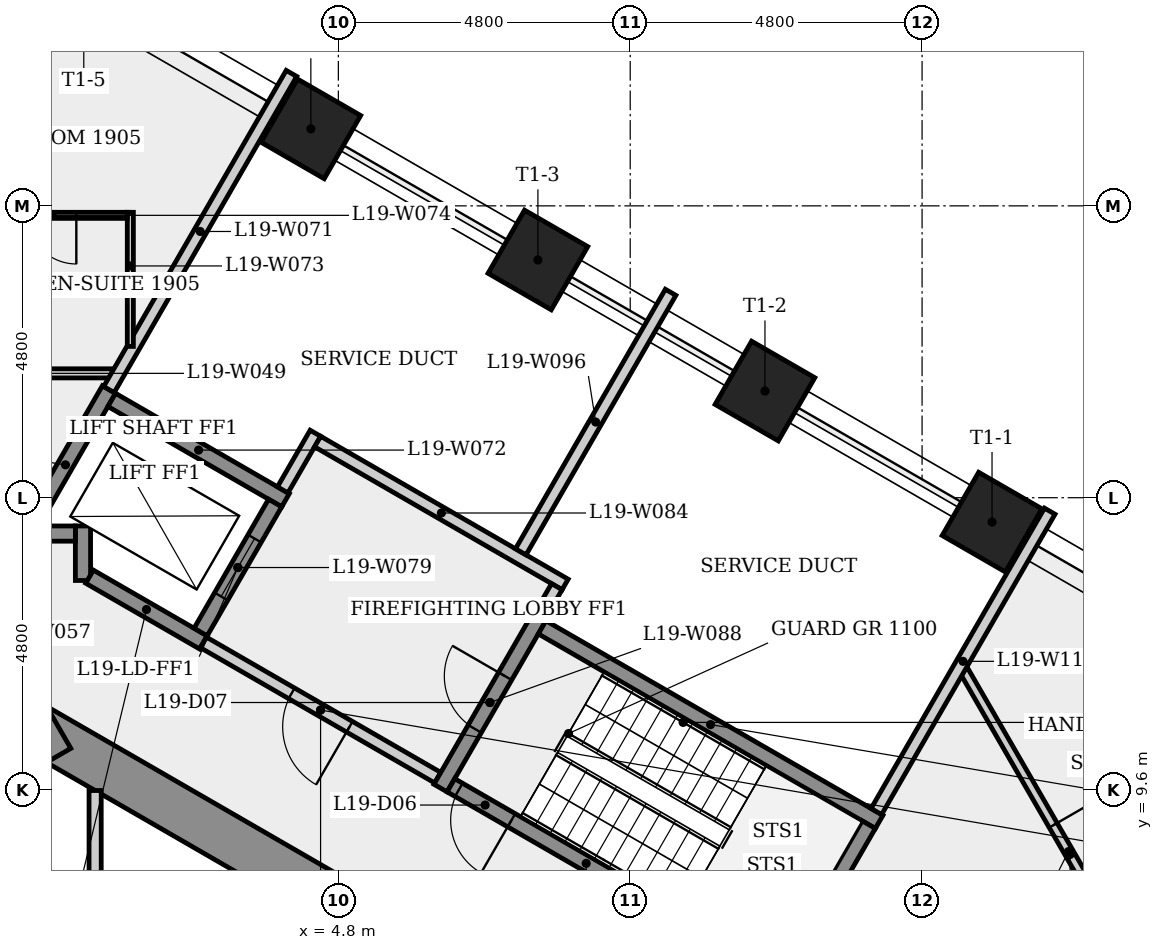
"""IFC4 building model, lengths in metres.
Left out: names, types, materials, properties, quantities, classifications, styles, units other than length and angle.
Written with IfcOpenShell. Run it as: python <this file> out.ifc"""

import sys

from ifc_helpers import new_model, si_unit, direction, frame, frame_2d, origin, origin_2d, place, context, subcontext, project, spatial, rectangle, extrude, element, fill, save


model = new_model("IFC4")
c1 = context("Model", 3, precision=1e-05, world=origin(), true_north=direction((0.0, 1.0)))
c2 = subcontext(c1, "Body", "Model", "MODEL_VIEW")
j1 = project(units=[si_unit("LENGTHUNIT", "METRE"), si_unit("PLANEANGLEUNIT", "RADIAN")], contexts=[c1])
p1 = place(None, origin())
s1 = spatial("IfcSite", under=j1, at=p1, CompositionType="ELEMENT")
p2 = place(p1, origin())
s2 = spatial("IfcBuilding", under=s1, at=p2, CompositionType="ELEMENT")
p3 = place(p2, frame((0.0, 0.0, 74.3)))
s3 = spatial("IfcBuildingStorey", under=s2, at=p3, CompositionType="ELEMENT", Elevation=74.3)
p4 = place(p3, frame((9.3, 5.138, 0.0), z_axis=(0.0, 0.0, 1.0), x_axis=(-0.866023993627, 0.500002442456, 0.0)))
e1 = element("IfcWall", 1, at=p4, inside=s3, PredefinedType="SHEAR", context=c2, shape_type="SweptSolid", body=[
    extrude(rectangle(XDim=10.97, YDim=0.8, at=frame_2d((5.485, 0.0))), origin(), (0.0, 0.0, 1.0), 4.0),
])
p5 = place(p4, frame((2.962, 0.0, 0.0)))
e2 = element("IfcOpeningElement", 2, at=p5, cuts=e1, PredefinedType="OPENING", context=c2, shape_type="SweptSolid", body=[
    extrude(rectangle(XDim=0.9, YDim=2.1, at=frame_2d((0.45, 1.05))), frame((0.0, 0.41, 0.0), z_axis=(0.0, -1.0, 0.0), x_axis=(1.0, 0.0, 0.0)), (0.0, 0.0, 1.0), 0.82),
])
p6 = place(p3, frame((0.2, 10.623, 0.0), z_axis=(0.0, 0.0, 1.0), x_axis=(-0.866023993627, -0.500002442456, 0.0)))
e3 = element("IfcWall", 3, at=p6, inside=s3, PredefinedType="SHEAR", context=c2, shape_type="SweptSolid", body=[
    extrude(rectangle(XDim=10.97, YDim=0.8, at=frame_2d((5.485, 0.0))), origin(), (0.0, 0.0, 1.0), 4.0),
])
p7 = place(p6, frame((9.325, 0.0, 0.0)))
e4 = element("IfcOpeningElement", 4, at=p7, cuts=e3, PredefinedType="OPENING", context=c2, shape_type="SweptSolid", body=[
    extrude(rectangle(XDim=0.9, YDim=2.1, at=frame_2d((0.45, 1.05))), frame((0.0, 0.41, 0.0), z_axis=(0.0, -1.0, 0.0), x_axis=(1.0, 0.0, 0.0)), (0.0, 0.0, 1.0), 0.82),
])
p8 = place(p6, frame((2.091, 0.0, 0.0)))
e5 = element("IfcOpeningElement", 5, at=p8, cuts=e3, PredefinedType="OPENING", context=c2, shape_type="SweptSolid", body=[
    extrude(rectangle(XDim=0.9, YDim=2.1, at=frame_2d((0.45, 1.05))), frame((0.0, 0.41, 0.0), z_axis=(0.0, -1.0, 0.0), x_axis=(1.0, 0.0, 0.0)), (0.0, 0.0, 1.0), 0.82),
])
for number, where, z_axis, x_axis in (
    (6, (15.55, 13.998, 0.0), (0.0, 0.0, 1.0), (0.5, 0.866, 0.0)),
    (7, (11.816, 16.154, 0.0), (0.0, 0.0, 1.0), (0.5, 0.866, 0.0)),
    (8, (8.082, 18.31, 0.0), (0.0, 0.0, 1.0), (0.5, 0.866, 0.0)),
    (9, (4.348, 20.466, 0.0), (0.0, 0.0, 1.0), (0.5, 0.866, 0.0)),
):
    element("IfcColumn", number, at=place(p3, frame(where, z_axis=z_axis, x_axis=x_axis)), inside=s3, PredefinedType="COLUMN", context=c2, shape_type="SweptSolid", body=[
        extrude(rectangle(XDim=1.2, YDim=1.2, at=origin_2d()), origin(), (0.0, 0.0, 1.0), 4.0),
    ])
p9 = place(p3, frame((-3.325, 16.445, 0.0), z_axis=(0.0, 0.0, 1.0), x_axis=(1.0, 0.0, 0.0)))
e10 = element("IfcWall", 10, at=p9, inside=s3, PredefinedType="PARTITIONING", context=c2, shape_type="SweptSolid", body=[
    extrude(rectangle(XDim=4.406, YDim=0.15, at=frame_2d((2.203, 0.0))), origin(), (0.0, 0.0, 1.0), 3.6),
])
p10 = place(p9, frame((0.745, 0.0, 0.0)))
e11 = element("IfcOpeningElement", 11, at=p10, cuts=e10, PredefinedType="OPENING", context=c2, shape_type="SweptSolid", body=[
    extrude(rectangle(XDim=0.9, YDim=2.1, at=frame_2d((0.45, 1.05))), frame((0.0, 0.085, 0.0), z_axis=(0.0, -1.0, 0.0), x_axis=(1.0, 0.0, 0.0)), (0.0, 0.0, 1.0), 0.17),
])
p11 = place(p3, frame((-0.403, 13.702, 0.0), z_axis=(0.0, 0.0, 1.0), x_axis=(0.499976111731, 0.866039195244, 0.0)))
e12 = element("IfcWall", 12, at=p11, inside=s3, PredefinedType="SHEAR", context=c2, shape_type="SweptSolid", body=[
    extrude(rectangle(XDim=2.861, YDim=0.25, at=frame_2d((1.43, 0.0))), origin(), (0.0, 0.0, 1.0), 3.6),
])
p12 = place(p3, frame((0.6, 13.039, 0.0), z_axis=(0.0, 0.0, 1.0), x_axis=(0.0, 1.0, 0.0)))
e13 = element("IfcWall", 13, at=p12, inside=s3, PredefinedType="SHEAR", context=c2, shape_type="SweptSolid", body=[
    extrude(rectangle(XDim=0.896, YDim=0.25, at=frame_2d((0.448, 0.0))), origin(), (0.0, 0.0, 1.0), 3.6),
])
p13 = place(p3, frame((0.475, 13.81, 0.0), z_axis=(0.0, 0.0, 1.0), x_axis=(-1.0, 0.0, 0.0)))
e14 = element("IfcWall", 14, at=p13, inside=s3, PredefinedType="SHEAR", context=c2, shape_type="SweptSolid", body=[
    extrude(rectangle(XDim=0.691, YDim=0.25, at=frame_2d((0.345, 0.0))), origin(), (0.0, 0.0, 1.0), 4.0),
])
p14 = place(p3, frame((0.8, 9.584, 0.0), z_axis=(0.0, 0.0, 1.0), x_axis=(0.0, -1.0, 0.0)))
e15 = element("IfcWall", 15, at=p14, inside=s3, PredefinedType="PARTITIONING", context=c2, shape_type="SweptSolid", body=[
    extrude(rectangle(XDim=4.309, YDim=0.2, at=frame_2d((2.155, 0.0))), origin(), (0.0, 0.0, 1.0), 3.6),
])
p15 = place(p3, frame((1.027, 16.179, 0.0), z_axis=(0.0, 0.0, 1.0), x_axis=(0.500005224826, 0.866022387209, 0.0)))
e16 = element("IfcWall", 16, at=p15, inside=s3, PredefinedType="PLUMBINGWALL", context=c2, shape_type="SweptSolid", body=[
    extrude(rectangle(XDim=6.004, YDim=0.2, at=frame_2d((3.002, 0.0))), origin(), (0.0, 0.0, 1.0), 3.6),
])
p16 = place(p3, frame((1.073, 16.008, 0.0), z_axis=(0.0, 0.0, 1.0), x_axis=(0.866040211805, -0.499974350878, 0.0)))
e17 = element("IfcWall", 17, at=p16, inside=s3, PredefinedType="SHEAR", context=c2, shape_type="SweptSolid", body=[
    extrude(rectangle(XDim=3.3, YDim=0.25, at=frame_2d((1.65, 0.0))), origin(), (0.0, 0.0, 1.0), 3.6),
])
p17 = place(p3, frame((1.379, 16.888, 0.0), z_axis=(0.0, 0.0, 1.0), x_axis=(0.0, 1.0, 0.0)))
e18 = element("IfcWall", 18, at=p17, inside=s3, PredefinedType="PARTITIONING", context=c2, shape_type="SweptSolid", body=[
    extrude(rectangle(XDim=2.206, YDim=0.1, at=frame_2d((1.103, 0.0))), origin(), (0.0, 0.0, 1.0), 3.6),
])
p18 = place(p3, frame((1.329, 19.044, 0.0), z_axis=(0.0, 0.0, 1.0), x_axis=(-1.0, 0.0, 0.0)))
e19 = element("IfcWall", 19, at=p18, inside=s3, PredefinedType="PARTITIONING", context=c2, shape_type="SweptSolid", body=[
    extrude(rectangle(XDim=2.476, YDim=0.1, at=frame_2d((1.238, 0.0))), origin(), (0.0, 0.0, 1.0), 3.6),
])
p19 = place(p18, frame((0.838, 0.0, 0.0)))
e20 = element("IfcOpeningElement", 20, at=p19, cuts=e19, PredefinedType="OPENING", context=c2, shape_type="SweptSolid", body=[
    extrude(rectangle(XDim=0.8, YDim=2.1, at=frame_2d((0.4, 1.05))), frame((0.0, 0.06, 0.0), z_axis=(0.0, -1.0, 0.0), x_axis=(1.0, 0.0, 0.0)), (0.0, 0.0, 1.0), 0.12),
])
p20 = place(p3, frame((2.581, 12.02, 0.0), z_axis=(0.0, 0.0, 1.0), x_axis=(-0.86603892542, 0.499976579108, 0.0)))
e21 = element("IfcWall", 21, at=p20, inside=s3, PredefinedType="SHEAR", context=c2, shape_type="SweptSolid", body=[
    extrude(rectangle(XDim=2.162, YDim=0.25, at=frame_2d((1.081, 0.0))), origin(), (0.0, 0.0, 1.0), 3.6),
])
p21 = place(p3, frame((2.535, 12.191, 0.0), z_axis=(0.0, 0.0, 1.0), x_axis=(0.500061746146, 0.865989751695, 0.0)))
e22 = element("IfcWall", 22, at=p21, inside=s3, PredefinedType="SHEAR", context=c2, shape_type="SweptSolid", body=[
    extrude(rectangle(XDim=2.45, YDim=0.25, at=frame_2d((1.225, 0.0))), origin(), (0.0, 0.0, 1.0), 4.0),
])
p22 = place(p21, frame((0.675, 0.0, 0.0)))
e23 = element("IfcOpeningElement", 23, at=p22, cuts=e22, PredefinedType="OPENING", context=c2, shape_type="SweptSolid", body=[
    extrude(rectangle(XDim=1.1, YDim=2.1, at=frame_2d((0.55, 1.05))), frame((0.0, 0.135, 0.0), z_axis=(0.0, -1.0, 0.0), x_axis=(1.0, 0.0, 0.0)), (0.0, 0.0, 1.0), 0.27),
])
p23 = place(p3, frame((3.885, 14.529, 0.0), z_axis=(0.0, 0.0, 1.0), x_axis=(0.499997628298, 0.866026773083, 0.0)))
e24 = element("IfcWall", 24, at=p23, inside=s3, PredefinedType="PLUMBINGWALL", context=c2, shape_type="SweptSolid", body=[
    extrude(rectangle(XDim=1.075, YDim=0.2, at=frame_2d((0.538, 0.0))), origin(), (0.0, 0.0, 1.0), 3.6),
])
p24 = place(p3, frame((4.459, 15.323, 0.0), z_axis=(0.0, 0.0, 1.0), x_axis=(0.866016039709, -0.500016218704, 0.0)))
e25 = element("IfcWall", 25, at=p24, inside=s3, PredefinedType="PLUMBINGWALL", context=c2, shape_type="SweptSolid", body=[
    extrude(rectangle(XDim=4.7, YDim=0.2, at=frame_2d((2.35, 0.0))), origin(), (0.0, 0.0, 1.0), 3.6),
])
p25 = place(p3, frame((6.435, 9.795, 0.0), z_axis=(0.0, 0.0, 1.0), x_axis=(-0.866012907634, 0.500021643343, 0.0)))
e26 = element("IfcWall", 26, at=p25, inside=s3, PredefinedType="PARTITIONING", context=c2, shape_type="SweptSolid", body=[
    extrude(rectangle(XDim=4.45, YDim=0.2, at=frame_2d((2.225, 0.0))), origin(), (0.0, 0.0, 1.0), 3.6),
])
p26 = place(p25, frame((1.675, 0.0, 0.0)))
e27 = element("IfcOpeningElement", 27, at=p26, cuts=e26, PredefinedType="OPENING", context=c2, shape_type="SweptSolid", body=[
    extrude(rectangle(XDim=1.1, YDim=2.1, at=frame_2d((0.55, 1.05))), frame((0.0, 0.11, 0.0), z_axis=(0.0, -1.0, 0.0), x_axis=(1.0, 0.0, 0.0)), (0.0, 0.0, 1.0), 0.22),
])
p27 = place(p3, frame((6.48, 9.624, 0.0), z_axis=(0.0, 0.0, 1.0), x_axis=(0.500017246033, 0.866015446554, 0.0)))
e28 = element("IfcWall", 28, at=p27, inside=s3, PredefinedType="SHEAR", context=c2, shape_type="SweptSolid", body=[
    extrude(rectangle(XDim=3.25, YDim=0.25, at=frame_2d((1.625, 0.0))), origin(), (0.0, 0.0, 1.0), 3.6),
])
p28 = place(p27, frame((1.125, 0.0, 0.0)))
e29 = element("IfcOpeningElement", 29, at=p28, cuts=e28, PredefinedType="OPENING", context=c2, shape_type="SweptSolid", body=[
    extrude(rectangle(XDim=1.0, YDim=2.1, at=frame_2d((0.5, 1.05))), frame((0.0, 0.135, 0.0), z_axis=(0.0, -1.0, 0.0), x_axis=(1.0, 0.0, 0.0)), (0.0, 0.0, 1.0), 0.27),
])
p29 = place(p3, frame((7.8, 13.51, 0.0), z_axis=(0.0, 0.0, 1.0), x_axis=(0.49998543329, 0.866033813715, 0.0)))
e30 = element("IfcWall", 30, at=p29, inside=s3, PredefinedType="PLUMBINGWALL", context=c2, shape_type="SweptSolid", body=[
    extrude(rectangle(XDim=4.929, YDim=0.2, at=frame_2d((2.464, 0.0))), origin(), (0.0, 0.0, 1.0), 3.6),
])
p30 = place(p3, frame((8.151, 12.268, 0.0), z_axis=(0.0, 0.0, 1.0), x_axis=(0.866025499775, -0.499999833739, 0.0)))
e31 = element("IfcWall", 31, at=p30, inside=s3, PredefinedType="SHEAR", context=c2, shape_type="SweptSolid", body=[
    extrude(rectangle(XDim=6.4, YDim=0.25, at=frame_2d((3.2, 0.0))), origin(), (0.0, 0.0, 1.0), 3.6),
])
p31 = place(p3, frame((8.393, 12.937, 0.0), z_axis=(0.0, 0.0, 1.0), x_axis=(-0.500065409566, -0.86598763626, 0.0)))
e32 = element("IfcWall", 32, at=p31, inside=s3, PredefinedType="PLUMBINGWALL", context=c2, shape_type="SweptSolid", body=[
    extrude(rectangle(XDim=0.575, YDim=0.2, at=frame_2d((0.288, 0.0))), origin(), (0.0, 0.0, 1.0), 3.6),
])
p32 = place(p3, frame((11.1, 7.101, 0.0), z_axis=(0.0, 0.0, 1.0), x_axis=(-0.8660265141, 0.499998076872, 0.0)))
e33 = element("IfcWall", 33, at=p32, inside=s3, PredefinedType="SHEAR", context=c2, shape_type="SweptSolid", body=[
    extrude(rectangle(XDim=5.137, YDim=0.25, at=frame_2d((2.569, 0.0))), origin(), (0.0, 0.0, 1.0), 3.6),
])
p33 = place(p32, frame((3.987, 0.0, 0.0)))
e34 = element("IfcOpeningElement", 34, at=p33, cuts=e33, PredefinedType="OPENING", context=c2, shape_type="SweptSolid", body=[
    extrude(rectangle(XDim=1.0, YDim=2.1, at=frame_2d((0.5, 1.05))), frame((0.0, 0.135, 0.0), z_axis=(0.0, -1.0, 0.0), x_axis=(1.0, 0.0, 0.0)), (0.0, 0.0, 1.0), 0.27),
])
p34 = place(p3, frame((13.523, 9.022, 0.0), z_axis=(0.0, 0.0, 1.0), x_axis=(-0.500013277472, -0.866017737897, 0.0)))
e35 = element("IfcWall", 35, at=p34, inside=s3, PredefinedType="SHEAR", context=c2, shape_type="SweptSolid", body=[
    extrude(rectangle(XDim=2.786, YDim=0.25, at=frame_2d((1.393, 0.0))), origin(), (0.0, 0.0, 1.0), 3.6),
])
p35 = place(p3, frame((15.087, 11.558, 0.0), z_axis=(0.0, 0.0, 1.0), x_axis=(0.499975479054, -0.866039560496, 0.0)))
e36 = element("IfcWall", 36, at=p35, inside=s3, PredefinedType="PARTITIONING", context=c2, shape_type="SweptSolid", body=[
    extrude(rectangle(XDim=6.988, YDim=0.15, at=frame_2d((3.494, 0.0))), origin(), (0.0, 0.0, 1.0), 3.6),
])
p36 = place(p35, frame((2.939, 0.0, 0.0)))
e37 = element("IfcOpeningElement", 37, at=p36, cuts=e36, PredefinedType="OPENING", context=c2, shape_type="SweptSolid", body=[
    extrude(rectangle(XDim=1.0, YDim=2.1, at=frame_2d((0.5, 1.05))), frame((0.0, 0.085, 0.0), z_axis=(0.0, -1.0, 0.0), x_axis=(1.0, 0.0, 0.0)), (0.0, 0.0, 1.0), 0.17),
])
p37 = place(p3, frame((13.648, 9.239, 0.0), z_axis=(0.0, 0.0, 1.0), x_axis=(0.499983049987, 0.866035189658, 0.0)))
e38 = element("IfcWall", 38, at=p37, inside=s3, PredefinedType="PLUMBINGWALL", context=c2, shape_type="SweptSolid", body=[
    extrude(rectangle(XDim=5.704, YDim=0.2, at=frame_2d((2.852, 0.0))), origin(), (0.0, 0.0, 1.0), 3.6),
])
p38 = place(p33, origin())
e39 = element("IfcDoor", 39, at=p38, inside=s3, OperationType="SINGLE_SWING_LEFT", PredefinedType="DOOR", context=c2, shape_type="SweptSolid", body=[
    extrude(rectangle(XDim=1.0, YDim=2.1, at=frame_2d((0.5, 1.05))), frame((0.0, 0.025, 0.0), z_axis=(0.0, -1.0, 0.0), x_axis=(1.0, 0.0, 0.0)), (0.0, 0.0, 1.0), 0.05),
])
fill(e34, e39)
p39 = place(p28, origin())
e40 = element("IfcDoor", 40, at=p39, inside=s3, OperationType="SINGLE_SWING_RIGHT", PredefinedType="DOOR", context=c2, shape_type="SweptSolid", body=[
    extrude(rectangle(XDim=1.0, YDim=2.1, at=frame_2d((0.5, 1.05))), frame((0.0, 0.025, 0.0), z_axis=(0.0, -1.0, 0.0), x_axis=(1.0, 0.0, 0.0)), (0.0, 0.0, 1.0), 0.05),
])
fill(e29, e40)
p40 = place(p26, origin())
e41 = element("IfcDoor", 41, at=p40, inside=s3, OperationType="SINGLE_SWING_LEFT", PredefinedType="DOOR", context=c2, shape_type="SweptSolid", body=[
    extrude(rectangle(XDim=1.1, YDim=2.1, at=frame_2d((0.55, 1.05))), frame((0.0, 0.025, 0.0), z_axis=(0.0, -1.0, 0.0), x_axis=(1.0, 0.0, 0.0)), (0.0, 0.0, 1.0), 0.05),
])
fill(e27, e41)
p41 = place(p22, origin())
e42 = element("IfcDoor", 42, at=p41, inside=s3, OperationType="SLIDING_TO_LEFT", PredefinedType="DOOR", context=c2, shape_type="SweptSolid", body=[
    extrude(rectangle(XDim=1.1, YDim=2.1, at=frame_2d((0.55, 1.05))), frame((0.0, 0.025, 0.0), z_axis=(0.0, -1.0, 0.0), x_axis=(1.0, 0.0, 0.0)), (0.0, 0.0, 1.0), 0.05),
])
fill(e23, e42)
p42 = place(p36, origin())
e43 = element("IfcDoor", 43, at=p42, inside=s3, OperationType="SINGLE_SWING_LEFT", PredefinedType="DOOR", context=c2, shape_type="SweptSolid", body=[
    extrude(rectangle(XDim=1.0, YDim=2.1, at=frame_2d((0.5, 1.05))), frame((0.0, 0.025, 0.0), z_axis=(0.0, -1.0, 0.0), x_axis=(1.0, 0.0, 0.0)), (0.0, 0.0, 1.0), 0.05),
])
fill(e37, e43)
p43 = place(p19, origin())
e44 = element("IfcDoor", 44, at=p43, inside=s3, OperationType="SINGLE_SWING_LEFT", PredefinedType="DOOR", context=c2, shape_type="SweptSolid", body=[
    extrude(rectangle(XDim=0.8, YDim=2.1, at=frame_2d((0.4, 1.05))), frame((0.0, 0.025, 0.0), z_axis=(0.0, -1.0, 0.0), x_axis=(1.0, 0.0, 0.0)), (0.0, 0.0, 1.0), 0.05),
])
fill(e20, e44)
save(model, sys.argv[1])
